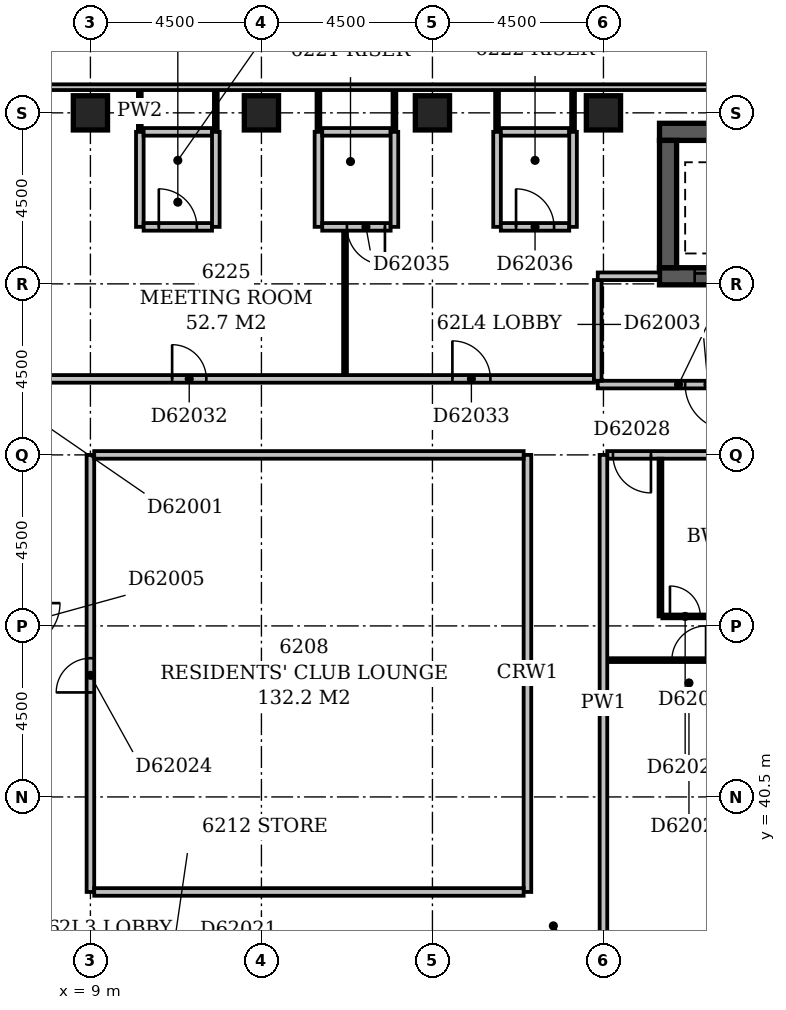
"""IFC4 building model, lengths in metres.
Left out: names, types, materials, properties, quantities, classifications, styles, units other than length and angle.
Written with IfcOpenShell. Run it as: python <this file> out.ifc"""

import sys

from ifc_helpers import new_model, si_unit, direction, frame, frame_2d, origin, origin_2d, place, context, subcontext, project, spatial, rectangle, extrude, element, fill, save


model = new_model("IFC4")
c1 = context("Model", 3, precision=1e-05, world=origin(), true_north=direction((0.0, 1.0)))
c2 = subcontext(c1, "Body", "Model", "MODEL_VIEW")
j1 = project(units=[si_unit("LENGTHUNIT", "METRE"), si_unit("PLANEANGLEUNIT", "RADIAN")], contexts=[c1])
p1 = place(None, origin())
s1 = spatial("IfcSite", under=j1, at=p1, CompositionType="ELEMENT")
p2 = place(p1, origin())
s2 = spatial("IfcBuilding", under=s1, at=p2, CompositionType="ELEMENT")
p3 = place(p2, frame((0.0, 0.0, 240.2)))
s3 = spatial("IfcBuildingStorey", under=s2, at=p3, CompositionType="ELEMENT", Elevation=240.2)
p4 = place(p3, frame((23.975, 54.2, -0.3), z_axis=(0.0, 0.0, 1.0), x_axis=(1.0, 0.0, 0.0)))
e1 = element("IfcWall", 1, at=p4, inside=s3, PredefinedType="SHEAR", context=c2, shape_type="SweptSolid", body=[
    extrude(rectangle(XDim=2.95, YDim=0.45, at=frame_2d((1.475, 0.0))), origin(), (0.0, 0.0, 1.0), 3.6),
])
p5 = place(p4, frame((0.925, 0.0, 0.3)))
e2 = element("IfcOpeningElement", 2, at=p5, cuts=e1, PredefinedType="OPENING", context=c2, shape_type="SweptSolid", body=[
    extrude(rectangle(XDim=1.1, YDim=2.1, at=frame_2d((0.55, 1.05))), frame((0.0, 0.237, 0.0), z_axis=(0.0, -1.0, 0.0), x_axis=(1.0, 0.0, 0.0)), (0.0, 0.0, 1.0), 0.474),
])
p6 = place(p3, frame((23.975, 58.0, -0.3), z_axis=(0.0, 0.0, 1.0), x_axis=(1.0, 0.0, 0.0)))
e3 = element("IfcWall", 3, at=p6, inside=s3, PredefinedType="SHEAR", context=c2, shape_type="SweptSolid", body=[
    extrude(rectangle(XDim=2.95, YDim=0.45, at=frame_2d((1.475, 0.0))), origin(), (0.0, 0.0, 1.0), 3.6),
])
p7 = place(p3, frame((24.2, 54.425, -0.3), z_axis=(0.0, 0.0, 1.0), x_axis=(0.0, 1.0, 0.0)))
e4 = element("IfcWall", 4, at=p7, inside=s3, PredefinedType="SHEAR", context=c2, shape_type="SweptSolid", body=[
    extrude(rectangle(XDim=3.35, YDim=0.45, at=frame_2d((1.675, 0.0))), origin(), (0.0, 0.0, 1.0), 3.6),
])
for number, where, z_axis, x_axis in (
    (5, (9.0, 58.5, -0.3), (0.0, 0.0, 1.0), (1.0, 0.0, 0.0)),
    (6, (13.5, 58.5, -0.3), (0.0, 0.0, 1.0), (1.0, 0.0, 0.0)),
    (7, (18.0, 58.5, -0.3), (0.0, 0.0, 1.0), (1.0, 0.0, 0.0)),
    (8, (22.5, 58.5, -0.3), (0.0, 0.0, 1.0), (1.0, 0.0, 0.0)),
):
    element("IfcColumn", number, at=place(p3, frame(where, z_axis=z_axis, x_axis=x_axis)), inside=s3, PredefinedType="COLUMN", context=c2, shape_type="SweptSolid", body=[
        extrude(rectangle(XDim=0.9, YDim=0.9, at=origin_2d()), origin(), (0.0, 0.0, 1.0), 3.6),
    ])
p8 = place(p3, frame((27.0, 59.175, 0.0), z_axis=(0.0, 0.0, 1.0), x_axis=(-1.0, 0.0, 0.0)))
e9 = element("IfcWall", 9, at=p8, inside=s3, PredefinedType="STANDARD", context=c2, shape_type="SweptSolid", body=[
    extrude(rectangle(XDim=27.75, YDim=0.15, at=frame_2d((13.875, 0.0))), origin(), (0.0, 0.0, 1.0), 2.7),
])
p9 = place(p3, frame((22.35, 51.35, 0.0), z_axis=(0.0, 0.0, 1.0), x_axis=(1.0, 0.0, 0.0)))
e10 = element("IfcWall", 10, at=p9, inside=s3, PredefinedType="PARTITIONING", context=c2, shape_type="SweptSolid", body=[
    extrude(rectangle(XDim=4.25, YDim=0.2, at=frame_2d((2.125, 0.0))), origin(), (0.0, 0.0, 1.0), 3.3),
])
p10 = place(p9, frame((2.3, 0.0, 0.0)))
e11 = element("IfcOpeningElement", 11, at=p10, cuts=e10, PredefinedType="OPENING", context=c2, shape_type="SweptSolid", body=[
    extrude(rectangle(XDim=1.2, YDim=2.1, at=frame_2d((0.6, 1.05))), frame((0.0, 0.112, 0.0), z_axis=(0.0, -1.0, 0.0), x_axis=(1.0, 0.0, 0.0)), (0.0, 0.0, 1.0), 0.224),
])
p11 = place(p3, frame((22.35, 54.2, 0.0), z_axis=(0.0, 0.0, 1.0), x_axis=(1.0, 0.0, 0.0)))
e12 = element("IfcWall", 12, at=p11, inside=s3, PredefinedType="PARTITIONING", context=c2, shape_type="SweptSolid", body=[
    extrude(rectangle(XDim=1.625, YDim=0.2, at=frame_2d((0.812, 0.0))), origin(), (0.0, 0.0, 1.0), 3.3),
])
p12 = place(p3, frame((22.35, 51.45, 0.0), z_axis=(0.0, 0.0, 1.0), x_axis=(0.0, 1.0, 0.0)))
e13 = element("IfcWall", 13, at=p12, inside=s3, PredefinedType="PARTITIONING", context=c2, shape_type="SweptSolid", body=[
    extrude(rectangle(XDim=2.65, YDim=0.2, at=frame_2d((1.325, 0.0))), origin(), (0.0, 0.0, 1.0), 3.3),
])
p13 = place(p3, frame((22.5, 36.45, 0.0), z_axis=(0.0, 0.0, 1.0), x_axis=(0.0, 1.0, 0.0)))
e14 = element("IfcWall", 14, at=p13, inside=s3, PredefinedType="PARTITIONING", context=c2, shape_type="SweptSolid", body=[
    extrude(rectangle(XDim=13.05, YDim=0.2, at=frame_2d((6.525, 0.0))), origin(), (0.0, 0.0, 1.0), 3.3),
])
p14 = place(p3, frame((9.0, 38.0, 0.0), z_axis=(0.0, 0.0, 1.0), x_axis=(0.0, 1.0, 0.0)))
e15 = element("IfcWall", 15, at=p14, inside=s3, PredefinedType="PARTITIONING", context=c2, shape_type="SweptSolid", body=[
    extrude(rectangle(XDim=11.5, YDim=0.2, at=frame_2d((5.75, 0.0))), origin(), (0.0, 0.0, 1.0), 3.3),
])
p15 = place(p14, frame((5.25, 0.0, 0.0)))
e16 = element("IfcOpeningElement", 16, at=p15, cuts=e15, PredefinedType="OPENING", context=c2, shape_type="SweptSolid", body=[
    extrude(rectangle(XDim=0.9, YDim=2.1, at=frame_2d((0.45, 1.05))), frame((0.0, 0.112, 0.0), z_axis=(0.0, -1.0, 0.0), x_axis=(1.0, 0.0, 0.0)), (0.0, 0.0, 1.0), 0.224),
])
p16 = place(p3, frame((9.1, 38.0, 0.0), z_axis=(0.0, 0.0, 1.0), x_axis=(1.0, 0.0, 0.0)))
e17 = element("IfcWall", 17, at=p16, inside=s3, PredefinedType="PARTITIONING", context=c2, shape_type="SweptSolid", body=[
    extrude(rectangle(XDim=11.3, YDim=0.2, at=frame_2d((5.65, 0.0))), origin(), (0.0, 0.0, 1.0), 3.3),
])
p17 = place(p3, frame((20.5, 38.0, 0.0), z_axis=(0.0, 0.0, 1.0), x_axis=(0.0, 1.0, 0.0)))
e18 = element("IfcWall", 18, at=p17, inside=s3, PredefinedType="PARTITIONING", context=c2, shape_type="SweptSolid", body=[
    extrude(rectangle(XDim=11.5, YDim=0.2, at=frame_2d((5.75, 0.0))), origin(), (0.0, 0.0, 1.0), 3.3),
])
p18 = place(p3, frame((22.6, 44.1, 0.0), z_axis=(0.0, 0.0, 1.0), x_axis=(1.0, 0.0, 0.0)))
e19 = element("IfcWall", 19, at=p18, inside=s3, PredefinedType="PARTITIONING", context=c2, shape_type="SweptSolid", body=[
    extrude(rectangle(XDim=4.4, YDim=0.1, at=frame_2d((2.2, 0.0))), origin(), (0.0, 0.0, 1.0), 3.3),
])
p19 = place(p18, frame((1.7, 0.0, 0.0)))
e20 = element("IfcOpeningElement", 20, at=p19, cuts=e19, PredefinedType="OPENING", context=c2, shape_type="SweptSolid", body=[
    extrude(rectangle(XDim=0.9, YDim=2.1, at=frame_2d((0.45, 1.05))), frame((0.0, 0.062, 0.0), z_axis=(0.0, -1.0, 0.0), x_axis=(1.0, 0.0, 0.0)), (0.0, 0.0, 1.0), 0.124),
])
p20 = place(p3, frame((24.0, 45.25, 0.0), z_axis=(0.0, 0.0, 1.0), x_axis=(0.0, 1.0, 0.0)))
e21 = element("IfcWall", 21, at=p20, inside=s3, PredefinedType="PARTITIONING", context=c2, shape_type="SweptSolid", body=[
    extrude(rectangle(XDim=4.15, YDim=0.1, at=frame_2d((2.075, 0.0))), origin(), (0.0, 0.0, 1.0), 3.3),
])
p21 = place(p3, frame((24.05, 45.25, 0.0), z_axis=(0.0, 0.0, 1.0), x_axis=(1.0, 0.0, 0.0)))
e22 = element("IfcWall", 22, at=p21, inside=s3, PredefinedType="PARTITIONING", context=c2, shape_type="SweptSolid", body=[
    extrude(rectangle(XDim=2.95, YDim=0.1, at=frame_2d((1.475, 0.0))), origin(), (0.0, 0.0, 1.0), 3.3),
])
p22 = place(p21, frame((1.7, 0.0, 0.0)))
e23 = element("IfcOpeningElement", 23, at=p22, cuts=e22, PredefinedType="OPENING", context=c2, shape_type="SweptSolid", body=[
    extrude(rectangle(XDim=0.8, YDim=2.1, at=frame_2d((0.4, 1.05))), frame((0.0, 0.062, 0.0), z_axis=(0.0, -1.0, 0.0), x_axis=(1.0, 0.0, 0.0)), (0.0, 0.0, 1.0), 0.124),
])
p23 = place(p21, frame((0.2, 0.0, 0.0)))
e24 = element("IfcOpeningElement", 24, at=p23, cuts=e22, PredefinedType="OPENING", context=c2, shape_type="SweptSolid", body=[
    extrude(rectangle(XDim=0.8, YDim=2.1, at=frame_2d((0.4, 1.05))), frame((0.0, 0.062, 0.0), z_axis=(0.0, -1.0, 0.0), x_axis=(1.0, 0.0, 0.0)), (0.0, 0.0, 1.0), 0.124),
])
p24 = place(p3, frame((9.1, 49.5, 0.0), z_axis=(0.0, 0.0, 1.0), x_axis=(1.0, 0.0, 0.0)))
e25 = element("IfcWall", 25, at=p24, inside=s3, PredefinedType="PARTITIONING", context=c2, shape_type="SweptSolid", body=[
    extrude(rectangle(XDim=11.3, YDim=0.2, at=frame_2d((5.65, 0.0))), origin(), (0.0, 0.0, 1.0), 3.3),
])
p25 = place(p3, frame((22.6, 49.5, 0.0), z_axis=(0.0, 0.0, 1.0), x_axis=(1.0, 0.0, 0.0)))
e26 = element("IfcWall", 26, at=p25, inside=s3, PredefinedType="PARTITIONING", context=c2, shape_type="SweptSolid", body=[
    extrude(rectangle(XDim=4.4, YDim=0.2, at=frame_2d((2.2, 0.0))), origin(), (0.0, 0.0, 1.0), 3.3),
])
p26 = place(p25, frame((0.15, 0.0, 0.0)))
e27 = element("IfcOpeningElement", 27, at=p26, cuts=e26, PredefinedType="OPENING", context=c2, shape_type="SweptSolid", body=[
    extrude(rectangle(XDim=1.0, YDim=2.1, at=frame_2d((0.5, 1.05))), frame((0.0, 0.112, 0.0), z_axis=(0.0, -1.0, 0.0), x_axis=(1.0, 0.0, 0.0)), (0.0, 0.0, 1.0), 0.224),
])
p27 = place(p3, frame((7.6, 51.5, 0.0), z_axis=(0.0, 0.0, 1.0), x_axis=(1.0, 0.0, 0.0)))
e28 = element("IfcWall", 28, at=p27, inside=s3, PredefinedType="PARTITIONING", context=c2, shape_type="SweptSolid", body=[
    extrude(rectangle(XDim=14.65, YDim=0.2, at=frame_2d((7.325, 0.0))), origin(), (0.0, 0.0, 1.0), 3.3),
])
p28 = place(p27, frame((3.55, 0.0, 0.0)))
e29 = element("IfcOpeningElement", 29, at=p28, cuts=e28, PredefinedType="OPENING", context=c2, shape_type="SweptSolid", body=[
    extrude(rectangle(XDim=0.9, YDim=2.1, at=frame_2d((0.45, 1.05))), frame((0.0, 0.112, 0.0), z_axis=(0.0, -1.0, 0.0), x_axis=(1.0, 0.0, 0.0)), (0.0, 0.0, 1.0), 0.224),
])
p29 = place(p27, frame((10.925, 0.0, 0.0)))
e30 = element("IfcOpeningElement", 30, at=p29, cuts=e28, PredefinedType="OPENING", context=c2, shape_type="SweptSolid", body=[
    extrude(rectangle(XDim=1.0, YDim=2.1, at=frame_2d((0.5, 1.05))), frame((0.0, 0.112, 0.0), z_axis=(0.0, -1.0, 0.0), x_axis=(1.0, 0.0, 0.0)), (0.0, 0.0, 1.0), 0.224),
])
p30 = place(p3, frame((15.7, 51.6, 0.0), z_axis=(0.0, 0.0, 1.0), x_axis=(0.0, 1.0, 0.0)))
e31 = element("IfcWall", 31, at=p30, inside=s3, PredefinedType="PARTITIONING", context=c2, shape_type="SweptSolid", body=[
    extrude(rectangle(XDim=3.8, YDim=0.1, at=frame_2d((1.9, 0.0))), origin(), (0.0, 0.0, 1.0), 3.3),
])
p31 = place(p3, frame((10.3, 55.5, 0.0), z_axis=(0.0, 0.0, 1.0), x_axis=(0.0, 1.0, 0.0)))
e32 = element("IfcWall", 32, at=p31, inside=s3, PredefinedType="PARTITIONING", context=c2, shape_type="SweptSolid", body=[
    extrude(rectangle(XDim=2.5, YDim=0.2, at=frame_2d((1.25, 0.0))), origin(), (0.0, 0.0, 1.0), 3.3),
])
p32 = place(p3, frame((10.4, 55.5, 0.0), z_axis=(0.0, 0.0, 1.0), x_axis=(1.0, 0.0, 0.0)))
e33 = element("IfcWall", 33, at=p32, inside=s3, PredefinedType="PARTITIONING", context=c2, shape_type="SweptSolid", body=[
    extrude(rectangle(XDim=1.8, YDim=0.2, at=frame_2d((0.9, 0.0))), origin(), (0.0, 0.0, 1.0), 3.3),
])
p33 = place(p32, frame((0.4, 0.0, 0.0)))
e34 = element("IfcOpeningElement", 34, at=p33, cuts=e33, PredefinedType="OPENING", context=c2, shape_type="SweptSolid", body=[
    extrude(rectangle(XDim=1.0, YDim=2.1, at=frame_2d((0.5, 1.05))), frame((0.0, 0.112, 0.0), z_axis=(0.0, -1.0, 0.0), x_axis=(1.0, 0.0, 0.0)), (0.0, 0.0, 1.0), 0.224),
])
for number, where, z_axis, x_axis in (
    (35, (12.3, 55.5, 0.0), (0.0, 0.0, 1.0), (0.0, 1.0, 0.0)),
    (36, (15.0, 55.5, 0.0), (0.0, 0.0, 1.0), (0.0, 1.0, 0.0)),
):
    element("IfcWall", number, at=place(p3, frame(where, z_axis=z_axis, x_axis=x_axis)), inside=s3, PredefinedType="PARTITIONING", context=c2, shape_type="SweptSolid", body=[
        extrude(rectangle(XDim=2.5, YDim=0.2, at=frame_2d((1.25, 0.0))), origin(), (0.0, 0.0, 1.0), 3.3),
    ])
p34 = place(p3, frame((15.1, 55.5, 0.0), z_axis=(0.0, 0.0, 1.0), x_axis=(1.0, 0.0, 0.0)))
e37 = element("IfcWall", 37, at=p34, inside=s3, PredefinedType="PARTITIONING", context=c2, shape_type="SweptSolid", body=[
    extrude(rectangle(XDim=1.8, YDim=0.2, at=frame_2d((0.9, 0.0))), origin(), (0.0, 0.0, 1.0), 3.3),
])
p35 = place(p34, frame((0.65, 0.0, 0.0)))
e38 = element("IfcOpeningElement", 38, at=p35, cuts=e37, PredefinedType="OPENING", context=c2, shape_type="SweptSolid", body=[
    extrude(rectangle(XDim=1.0, YDim=2.1, at=frame_2d((0.5, 1.05))), frame((0.0, 0.112, 0.0), z_axis=(0.0, -1.0, 0.0), x_axis=(1.0, 0.0, 0.0)), (0.0, 0.0, 1.0), 0.224),
])
for number, where, z_axis, x_axis in (
    (39, (17.0, 55.5, 0.0), (0.0, 0.0, 1.0), (0.0, 1.0, 0.0)),
    (40, (19.7, 55.5, 0.0), (0.0, 0.0, 1.0), (0.0, 1.0, 0.0)),
):
    element("IfcWall", number, at=place(p3, frame(where, z_axis=z_axis, x_axis=x_axis)), inside=s3, PredefinedType="PARTITIONING", context=c2, shape_type="SweptSolid", body=[
        extrude(rectangle(XDim=2.5, YDim=0.2, at=frame_2d((1.25, 0.0))), origin(), (0.0, 0.0, 1.0), 3.3),
    ])
p36 = place(p3, frame((19.8, 55.5, 0.0), z_axis=(0.0, 0.0, 1.0), x_axis=(1.0, 0.0, 0.0)))
e41 = element("IfcWall", 41, at=p36, inside=s3, PredefinedType="PARTITIONING", context=c2, shape_type="SweptSolid", body=[
    extrude(rectangle(XDim=1.8, YDim=0.2, at=frame_2d((0.9, 0.0))), origin(), (0.0, 0.0, 1.0), 3.3),
])
p37 = place(p36, frame((0.4, 0.0, 0.0)))
e42 = element("IfcOpeningElement", 42, at=p37, cuts=e41, PredefinedType="OPENING", context=c2, shape_type="SweptSolid", body=[
    extrude(rectangle(XDim=1.0, YDim=2.1, at=frame_2d((0.5, 1.05))), frame((0.0, 0.112, 0.0), z_axis=(0.0, -1.0, 0.0), x_axis=(1.0, 0.0, 0.0)), (0.0, 0.0, 1.0), 0.224),
])
p38 = place(p3, frame((21.7, 55.5, 0.0), z_axis=(0.0, 0.0, 1.0), x_axis=(0.0, 1.0, 0.0)))
e43 = element("IfcWall", 43, at=p38, inside=s3, PredefinedType="PARTITIONING", context=c2, shape_type="SweptSolid", body=[
    extrude(rectangle(XDim=2.5, YDim=0.2, at=frame_2d((1.25, 0.0))), origin(), (0.0, 0.0, 1.0), 3.3),
])
p39 = place(p3, frame((10.3, 58.0, 0.0), z_axis=(0.0, 0.0, 1.0), x_axis=(0.0, 1.0, 0.0)))
e44 = element("IfcWall", 44, at=p39, inside=s3, PredefinedType="PARTITIONING", context=c2, shape_type="SweptSolid", body=[
    extrude(rectangle(XDim=1.1, YDim=0.1, at=frame_2d((0.55, 0.0))), origin(), (0.0, 0.0, 1.0), 3.3),
])
p40 = place(p3, frame((10.4, 58.0, 0.0), z_axis=(0.0, 0.0, 1.0), x_axis=(1.0, 0.0, 0.0)))
e45 = element("IfcWall", 45, at=p40, inside=s3, PredefinedType="PARTITIONING", context=c2, shape_type="SweptSolid", body=[
    extrude(rectangle(XDim=1.8, YDim=0.2, at=frame_2d((0.9, 0.0))), origin(), (0.0, 0.0, 1.0), 3.3),
])
for number, where, z_axis, x_axis in (
    (46, (12.3, 58.0, 0.0), (0.0, 0.0, 1.0), (0.0, 1.0, 0.0)),
    (47, (15.0, 58.0, 0.0), (0.0, 0.0, 1.0), (0.0, 1.0, 0.0)),
):
    element("IfcWall", number, at=place(p3, frame(where, z_axis=z_axis, x_axis=x_axis)), inside=s3, PredefinedType="PARTITIONING", context=c2, shape_type="SweptSolid", body=[
        extrude(rectangle(XDim=1.1, YDim=0.1, at=frame_2d((0.55, 0.0))), origin(), (0.0, 0.0, 1.0), 3.3),
    ])
p41 = place(p3, frame((15.1, 58.0, 0.0), z_axis=(0.0, 0.0, 1.0), x_axis=(1.0, 0.0, 0.0)))
e48 = element("IfcWall", 48, at=p41, inside=s3, PredefinedType="PARTITIONING", context=c2, shape_type="SweptSolid", body=[
    extrude(rectangle(XDim=1.8, YDim=0.2, at=frame_2d((0.9, 0.0))), origin(), (0.0, 0.0, 1.0), 3.3),
])
for number, where, z_axis, x_axis in (
    (49, (17.0, 58.0, 0.0), (0.0, 0.0, 1.0), (0.0, 1.0, 0.0)),
    (50, (19.7, 58.0, 0.0), (0.0, 0.0, 1.0), (0.0, 1.0, 0.0)),
):
    element("IfcWall", number, at=place(p3, frame(where, z_axis=z_axis, x_axis=x_axis)), inside=s3, PredefinedType="PARTITIONING", context=c2, shape_type="SweptSolid", body=[
        extrude(rectangle(XDim=1.1, YDim=0.1, at=frame_2d((0.55, 0.0))), origin(), (0.0, 0.0, 1.0), 3.3),
    ])
p42 = place(p3, frame((19.8, 58.0, 0.0), z_axis=(0.0, 0.0, 1.0), x_axis=(1.0, 0.0, 0.0)))
e51 = element("IfcWall", 51, at=p42, inside=s3, PredefinedType="PARTITIONING", context=c2, shape_type="SweptSolid", body=[
    extrude(rectangle(XDim=1.8, YDim=0.2, at=frame_2d((0.9, 0.0))), origin(), (0.0, 0.0, 1.0), 3.3),
])
p43 = place(p3, frame((21.7, 58.0, 0.0), z_axis=(0.0, 0.0, 1.0), x_axis=(0.0, 1.0, 0.0)))
e52 = element("IfcWall", 52, at=p43, inside=s3, PredefinedType="PARTITIONING", context=c2, shape_type="SweptSolid", body=[
    extrude(rectangle(XDim=1.1, YDim=0.1, at=frame_2d((0.55, 0.0))), origin(), (0.0, 0.0, 1.0), 3.3),
])
p44 = place(p10, origin())
e53 = element("IfcDoor", 53, at=p44, inside=s3, OperationType="SINGLE_SWING_RIGHT", PredefinedType="DOOR", context=c2, shape_type="SweptSolid", body=[
    extrude(rectangle(XDim=1.2, YDim=2.1, at=frame_2d((0.6, 1.05))), frame((0.0, 0.025, 0.0), z_axis=(0.0, -1.0, 0.0), x_axis=(1.0, 0.0, 0.0)), (0.0, 0.0, 1.0), 0.05),
])
fill(e11, e53)
p45 = place(p5, origin())
e54 = element("IfcDoor", 54, at=p45, inside=s3, OperationType="SLIDING_TO_LEFT", PredefinedType="DOOR", context=c2, shape_type="SweptSolid", body=[
    extrude(rectangle(XDim=1.1, YDim=2.1, at=frame_2d((0.55, 1.05))), frame((0.0, 0.025, 0.0), z_axis=(0.0, -1.0, 0.0), x_axis=(1.0, 0.0, 0.0)), (0.0, 0.0, 1.0), 0.05),
])
fill(e2, e54)
p46 = place(p15, origin())
e55 = element("IfcDoor", 55, at=p46, inside=s3, OperationType="SINGLE_SWING_LEFT", PredefinedType="DOOR", context=c2, shape_type="SweptSolid", body=[
    extrude(rectangle(XDim=0.9, YDim=2.1, at=frame_2d((0.45, 1.05))), frame((0.0, 0.025, 0.0), z_axis=(0.0, -1.0, 0.0), x_axis=(1.0, 0.0, 0.0)), (0.0, 0.0, 1.0), 0.05),
])
fill(e16, e55)
p47 = place(p19, frame((0.9, 0.0, 0.0), z_axis=(0.0, 0.0, 1.0), x_axis=(-1.0, 0.0, 0.0)))
e56 = element("IfcDoor", 56, at=p47, inside=s3, OperationType="SINGLE_SWING_LEFT", PredefinedType="DOOR", context=c2, shape_type="SweptSolid", body=[
    extrude(rectangle(XDim=0.9, YDim=2.1, at=frame_2d((0.45, 1.05))), frame((0.0, 0.025, 0.0), z_axis=(0.0, -1.0, 0.0), x_axis=(1.0, 0.0, 0.0)), (0.0, 0.0, 1.0), 0.05),
])
fill(e20, e56)
p48 = place(p23, origin())
e57 = element("IfcDoor", 57, at=p48, inside=s3, OperationType="SINGLE_SWING_LEFT", PredefinedType="DOOR", context=c2, shape_type="SweptSolid", body=[
    extrude(rectangle(XDim=0.8, YDim=2.1, at=frame_2d((0.4, 1.05))), frame((0.0, 0.025, 0.0), z_axis=(0.0, -1.0, 0.0), x_axis=(1.0, 0.0, 0.0)), (0.0, 0.0, 1.0), 0.05),
])
fill(e24, e57)
p49 = place(p26, origin())
e58 = element("IfcDoor", 58, at=p49, inside=s3, OperationType="SINGLE_SWING_RIGHT", PredefinedType="DOOR", context=c2, shape_type="SweptSolid", body=[
    extrude(rectangle(XDim=1.0, YDim=2.1, at=frame_2d((0.5, 1.05))), frame((0.0, 0.025, 0.0), z_axis=(0.0, -1.0, 0.0), x_axis=(1.0, 0.0, 0.0)), (0.0, 0.0, 1.0), 0.05),
])
fill(e27, e58)
p50 = place(p28, origin())
e59 = element("IfcDoor", 59, at=p50, inside=s3, OperationType="SINGLE_SWING_LEFT", PredefinedType="DOOR", context=c2, shape_type="SweptSolid", body=[
    extrude(rectangle(XDim=0.9, YDim=2.1, at=frame_2d((0.45, 1.05))), frame((0.0, 0.025, 0.0), z_axis=(0.0, -1.0, 0.0), x_axis=(1.0, 0.0, 0.0)), (0.0, 0.0, 1.0), 0.05),
])
fill(e29, e59)
p51 = place(p29, origin())
e60 = element("IfcDoor", 60, at=p51, inside=s3, OperationType="SINGLE_SWING_LEFT", PredefinedType="DOOR", context=c2, shape_type="SweptSolid", body=[
    extrude(rectangle(XDim=1.0, YDim=2.1, at=frame_2d((0.5, 1.05))), frame((0.0, 0.025, 0.0), z_axis=(0.0, -1.0, 0.0), x_axis=(1.0, 0.0, 0.0)), (0.0, 0.0, 1.0), 0.05),
])
fill(e30, e60)
p52 = place(p33, origin())
e61 = element("IfcDoor", 61, at=p52, inside=s3, OperationType="SINGLE_SWING_LEFT", PredefinedType="DOOR", context=c2, shape_type="SweptSolid", body=[
    extrude(rectangle(XDim=1.0, YDim=2.1, at=frame_2d((0.5, 1.05))), frame((0.0, 0.025, 0.0), z_axis=(0.0, -1.0, 0.0), x_axis=(1.0, 0.0, 0.0)), (0.0, 0.0, 1.0), 0.05),
])
fill(e34, e61)
p53 = place(p35, origin())
e62 = element("IfcDoor", 62, at=p53, inside=s3, OperationType="SINGLE_SWING_RIGHT", PredefinedType="DOOR", context=c2, shape_type="SweptSolid", body=[
    extrude(rectangle(XDim=1.0, YDim=2.1, at=frame_2d((0.5, 1.05))), frame((0.0, 0.025, 0.0), z_axis=(0.0, -1.0, 0.0), x_axis=(1.0, 0.0, 0.0)), (0.0, 0.0, 1.0), 0.05),
])
fill(e38, e62)
p54 = place(p37, origin())
e63 = element("IfcDoor", 63, at=p54, inside=s3, OperationType="SINGLE_SWING_LEFT", PredefinedType="DOOR", context=c2, shape_type="SweptSolid", body=[
    extrude(rectangle(XDim=1.0, YDim=2.1, at=frame_2d((0.5, 1.05))), frame((0.0, 0.025, 0.0), z_axis=(0.0, -1.0, 0.0), x_axis=(1.0, 0.0, 0.0)), (0.0, 0.0, 1.0), 0.05),
])
fill(e42, e63)
save(model, sys.argv[1])
